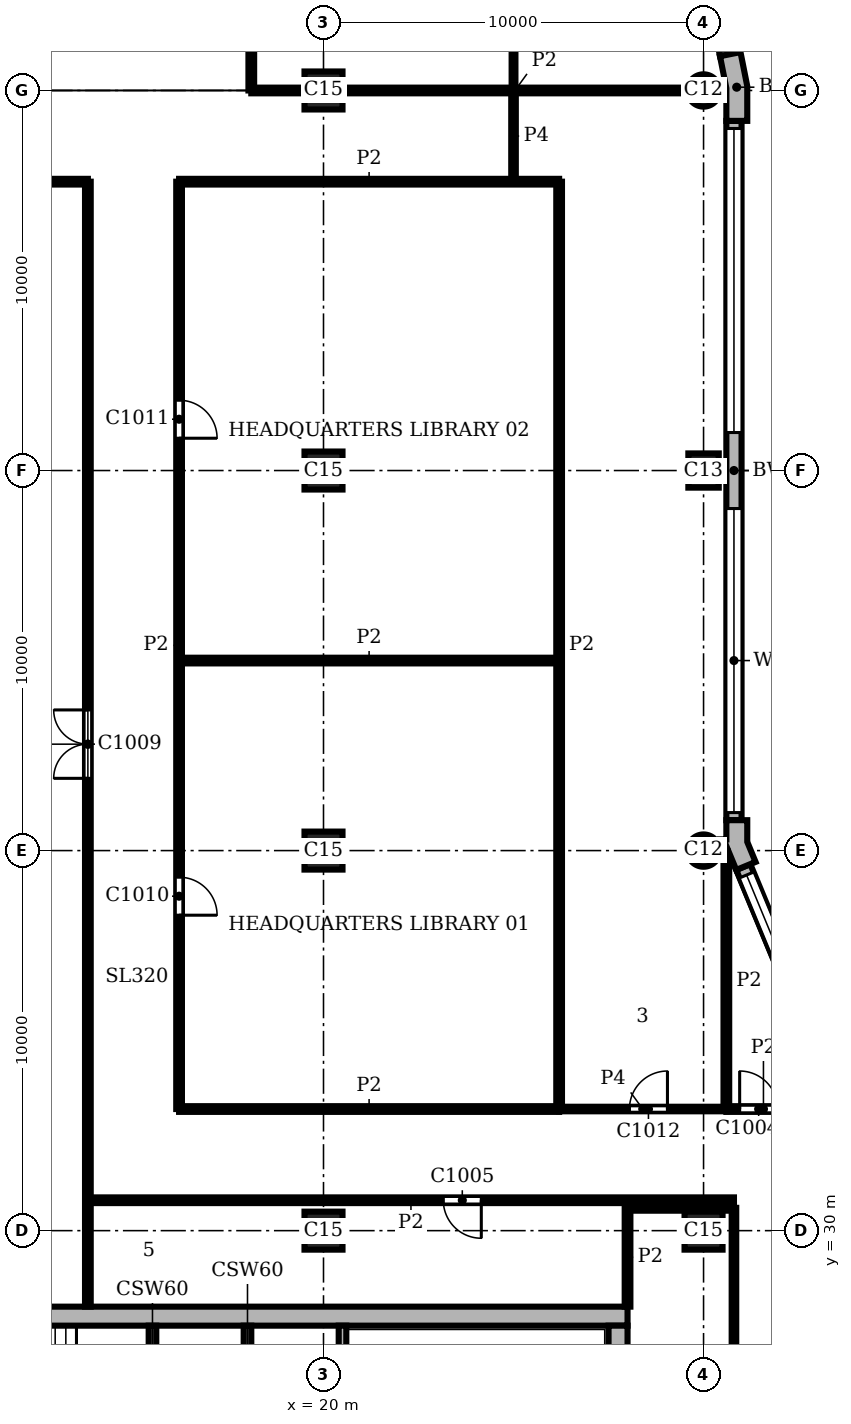
"""IFC4 building model, lengths in metres.
Left out: names, types, materials, properties, quantities, classifications, styles, units other than length and angle.
Written with IfcOpenShell. Run it as: python <this file> out.ifc"""

import sys

from ifc_helpers import new_model, si_unit, direction, frame, frame_2d, origin, origin_2d, place, context, subcontext, project, spatial, polyline, rectangle, circle, outline, extrude, element, fill, save


model = new_model("IFC4")
c1 = context("Model", 3, precision=1e-05, world=origin(), true_north=direction((0.0, 1.0)))
c2 = subcontext(c1, "Body", "Model", "MODEL_VIEW")
j1 = project(units=[si_unit("LENGTHUNIT", "METRE"), si_unit("PLANEANGLEUNIT", "RADIAN")], contexts=[c1])
p1 = place(None, origin())
s1 = spatial("IfcSite", under=j1, at=p1, CompositionType="ELEMENT")
p2 = place(p1, origin())
s2 = spatial("IfcBuilding", under=s1, at=p2, CompositionType="ELEMENT")
p3 = place(p2, frame((0.0, 0.0, 341.1)))
s3 = spatial("IfcBuildingStorey", under=s2, at=p3, CompositionType="ELEMENT", Elevation=341.1)
p4 = place(p3, frame((30.0, 40.0, 0.0), z_axis=(0.0, 0.0, 1.0), x_axis=(1.0, 0.0, 0.0)))
e1 = element("IfcColumn", 1, at=p4, inside=s3, PredefinedType="COLUMN", context=c2, shape_type="SweptSolid", body=[
    extrude(circle(Radius=0.425, at=origin_2d()), origin(), (0.0, 0.0, 1.0), 3.9),
])
p5 = place(p3, frame((30.0, 50.0, 0.0), z_axis=(0.0, 0.0, 1.0), x_axis=(0.0, 1.0, 0.0)))
e2 = element("IfcColumn", 2, at=p5, inside=s3, PredefinedType="COLUMN", context=c2, shape_type="SweptSolid", body=[
    extrude(rectangle(XDim=0.9, YDim=0.8, at=origin_2d()), origin(), (0.0, 0.0, 1.0), 3.9),
])
p6 = place(p3, frame((30.0, 60.0, 0.0), z_axis=(0.0, 0.0, 1.0), x_axis=(1.0, 0.0, 0.0)))
e3 = element("IfcColumn", 3, at=p6, inside=s3, PredefinedType="COLUMN", context=c2, shape_type="SweptSolid", body=[
    extrude(circle(Radius=0.425, at=origin_2d()), origin(), (0.0, 0.0, 1.0), 3.9),
])
for number, where, z_axis, x_axis in (
    (4, (20.0, 30.0, 0.0), (0.0, 0.0, 1.0), (1.0, 0.0, 0.0)),
    (5, (20.0, 40.0, 0.0), (0.0, 0.0, 1.0), (1.0, 0.0, 0.0)),
    (6, (20.0, 50.0, 0.0), (0.0, 0.0, 1.0), (1.0, 0.0, 0.0)),
    (7, (20.0, 60.0, 0.0), (0.0, 0.0, 1.0), (1.0, 0.0, 0.0)),
    (8, (30.0, 30.0, 0.0), (0.0, 0.0, 1.0), (1.0, 0.0, 0.0)),
):
    element("IfcColumn", number, at=place(p3, frame(where, z_axis=z_axis, x_axis=x_axis)), inside=s3, PredefinedType="COLUMN", context=c2, shape_type="SweptSolid", body=[
        extrude(rectangle(XDim=1.0, YDim=1.0, at=origin_2d()), origin(), (0.0, 0.0, 1.0), 3.9),
    ])
p7 = place(p3, frame((27.75, 8.5, 0.0), z_axis=(0.0, 0.0, 1.0), x_axis=(0.0, 1.0, 0.0)))
e9 = element("IfcWall", 9, at=p7, inside=s3, PredefinedType="SHEAR", context=c2, shape_type="SweptSolid", body=[
    extrude(rectangle(XDim=19.0, YDim=0.5, at=frame_2d((9.5, 0.0))), origin(), (0.0, 0.0, 1.0), 3.9),
])
p8 = place(p7, frame((4.95, 0.0, 0.0)))
e10 = element("IfcOpeningElement", 10, at=p8, cuts=e9, PredefinedType="OPENING", context=c2, shape_type="SweptSolid", body=[
    extrude(rectangle(XDim=1.6, YDim=2.1, at=frame_2d((0.8, 1.05))), frame((0.0, 0.26, 0.0), z_axis=(0.0, -1.0, 0.0), x_axis=(1.0, 0.0, 0.0)), (0.0, 0.0, 1.0), 0.52),
])
p9 = place(p3, frame((28.0, 27.75, 0.0), z_axis=(0.0, 0.0, 1.0), x_axis=(-1.0, 0.0, 0.0)))
e11 = element("IfcWall", 11, at=p9, inside=s3, PredefinedType="SHEAR", context=c2, shape_type="SweptSolid", body=[
    extrude(rectangle(XDim=20.0, YDim=0.5, at=frame_2d((10.0, 0.0))), origin(), (0.0, 0.0, 1.0), 3.9),
])
p10 = place(p3, origin())
e12 = element("IfcWall", 12, at=p10, inside=s3, PredefinedType="SOLIDWALL", context=c2, shape_type="SweptSolid", body=[
    extrude(outline(polyline([(30.62, 39.995), (30.62, 40.071), (30.861, 39.49), (31.23, 39.644), (31.369, 39.701), (31.15, 40.229), (31.15, 40.8), (31.0, 40.8), (30.6, 40.8), (30.6, 40.295), (30.425, 40.295), (30.425, 39.995), (30.62, 39.995)])), origin(), (0.0, 0.0, 1.0), 3.9),
])
e13 = element("IfcWall", 13, at=p10, inside=s3, PredefinedType="SOLIDWALL", context=c2, shape_type="SweptSolid", body=[
    extrude(outline(polyline([(31.0, 59.2), (31.15, 59.2), (31.15, 60.113), (30.972, 61.009), (30.825, 60.98), (30.432, 60.902), (30.6, 60.059), (30.6, 59.2), (31.0, 59.2)])), origin(), (0.0, 0.0, 1.0), 3.9),
])
p11 = place(p3, frame((33.362, 33.974, 0.0), z_axis=(0.0, 0.0, 1.0), x_axis=(-0.382655745237, 0.923891000409, 0.0)))
e14 = element("IfcWall", 14, at=p11, inside=s3, PredefinedType="SOLIDWALL", context=c2, shape_type="SweptSolid", body=[
    extrude(rectangle(XDim=6.053, YDim=0.4, at=frame_2d((3.027, 0.0))), origin(), (0.0, 0.0, 1.0), 3.9),
])
p12 = place(p11, frame((0.227, 0.0, 0.9)))
e15 = element("IfcOpeningElement", 15, at=p12, cuts=e14, PredefinedType="OPENING", context=c2, shape_type="SweptSolid", body=[
    extrude(rectangle(XDim=5.6, YDim=2.35, at=frame_2d((2.8, 1.175))), frame((0.0, 0.21, 0.0), z_axis=(0.0, -1.0, 0.0), x_axis=(1.0, 0.0, 0.0)), (0.0, 0.0, 1.0), 0.42),
])
p13 = place(p3, frame((30.8, 40.8, 0.0), z_axis=(0.0, 0.0, 1.0), x_axis=(0.0, 1.0, 0.0)))
e16 = element("IfcWall", 16, at=p13, inside=s3, PredefinedType="SOLIDWALL", context=c2, shape_type="SweptSolid", body=[
    extrude(rectangle(XDim=18.4, YDim=0.4, at=frame_2d((9.2, 0.0))), origin(), (0.0, 0.0, 1.0), 3.9),
])
p14 = place(p13, frame((0.2, 0.0, 0.9)))
e17 = element("IfcOpeningElement", 17, at=p14, cuts=e16, PredefinedType="OPENING", context=c2, shape_type="SweptSolid", body=[
    extrude(rectangle(XDim=8.0, YDim=2.35, at=frame_2d((4.0, 1.175))), frame((0.0, 0.21, 0.0), z_axis=(0.0, -1.0, 0.0), x_axis=(1.0, 0.0, 0.0)), (0.0, 0.0, 1.0), 0.42),
])
p15 = place(p13, frame((10.2, 0.0, 0.9)))
e18 = element("IfcOpeningElement", 18, at=p15, cuts=e16, PredefinedType="OPENING", context=c2, shape_type="SweptSolid", body=[
    extrude(rectangle(XDim=8.0, YDim=2.35, at=frame_2d((4.0, 1.175))), frame((0.0, 0.21, 0.0), z_axis=(0.0, -1.0, 0.0), x_axis=(1.0, 0.0, 0.0)), (0.0, 0.0, 1.0), 0.42),
])
p16 = place(p3, frame((30.629, 60.941, 0.0), z_axis=(0.0, 0.0, 1.0), x_axis=(-0.195098533057, 0.98078364709, 0.0)))
e19 = element("IfcWall", 19, at=p16, inside=s3, PredefinedType="SOLIDWALL", context=c2, shape_type="SweptSolid", body=[
    extrude(rectangle(XDim=4.753, YDim=0.4, at=frame_2d((2.376, 0.0))), origin(), (0.0, 0.0, 1.0), 3.9),
])
p17 = place(p16, frame((0.226, 0.0, 0.9)))
e20 = element("IfcOpeningElement", 20, at=p17, cuts=e19, PredefinedType="OPENING", context=c2, shape_type="SweptSolid", body=[
    extrude(rectangle(XDim=4.3, YDim=2.35, at=frame_2d((2.15, 1.175))), frame((0.0, 0.21, 0.0), z_axis=(0.0, -1.0, 0.0), x_axis=(1.0, 0.0, 0.0)), (0.0, 0.0, 1.0), 0.42),
])
p18 = place(p3, frame((15.5, 23.6, 0.0), z_axis=(0.0, 0.0, 1.0), x_axis=(0.0, 1.0, 0.0)))
e21 = element("IfcWall", 21, at=p18, inside=s3, PredefinedType="SHEAR", context=c2, shape_type="SweptSolid", body=[
    extrude(rectangle(XDim=3.9, YDim=0.2, at=frame_2d((1.95, 0.0))), origin(), (0.0, 0.0, 1.0), 3.58),
])
p19 = place(p3, frame((18.0, 20.0, 0.0), z_axis=(0.0, 0.0, 1.0), x_axis=(0.0, 1.0, 0.0)))
e22 = element("IfcWall", 22, at=p19, inside=s3, PredefinedType="SHEAR", context=c2, shape_type="SweptSolid", body=[
    extrude(rectangle(XDim=7.5, YDim=0.2, at=frame_2d((3.75, 0.0))), origin(), (0.0, 0.0, 1.0), 3.58),
])
p20 = place(p19, frame((1.2, 0.0, 0.0)))
e23 = element("IfcOpeningElement", 23, at=p20, cuts=e22, PredefinedType="OPENING", context=c2, shape_type="SweptSolid", body=[
    extrude(rectangle(XDim=1.2, YDim=2.1, at=frame_2d((0.6, 1.05))), frame((0.0, 0.11, 0.0), z_axis=(0.0, -1.0, 0.0), x_axis=(1.0, 0.0, 0.0)), (0.0, 0.0, 1.0), 0.22),
])
p21 = place(p3, frame((20.5, 23.6, 0.0), z_axis=(0.0, 0.0, 1.0), x_axis=(0.0, 1.0, 0.0)))
e24 = element("IfcWall", 24, at=p21, inside=s3, PredefinedType="SHEAR", context=c2, shape_type="SweptSolid", body=[
    extrude(rectangle(XDim=3.9, YDim=0.2, at=frame_2d((1.95, 0.0))), origin(), (0.0, 0.0, 1.0), 3.58),
])
p22 = place(p3, frame((25.0, 60.0, 0.0), z_axis=(0.0, 0.0, 1.0), x_axis=(0.0, 1.0, 0.0)))
e25 = element("IfcWall", 25, at=p22, inside=s3, PredefinedType="PARTITIONING", context=c2, shape_type="SweptSolid", body=[
    extrude(rectangle(XDim=8.0, YDim=0.1, at=frame_2d((4.0, 0.0))), origin(), (0.0, 0.0, 1.0), 3.58),
])
p23 = place(p22, frame((2.6, 0.0, 0.0)))
e26 = element("IfcOpeningElement", 26, at=p23, cuts=e25, PredefinedType="OPENING", context=c2, shape_type="SweptSolid", body=[
    extrude(rectangle(XDim=0.9, YDim=2.1, at=frame_2d((0.45, 1.05))), frame((0.0, 0.06, 0.0), z_axis=(0.0, -1.0, 0.0), x_axis=(1.0, 0.0, 0.0)), (0.0, 0.0, 1.0), 0.12),
])
p24 = place(p3, frame((13.8, 28.0, 0.0), z_axis=(0.0, 0.0, 1.0), x_axis=(0.0, 1.0, 0.0)))
e27 = element("IfcWall", 27, at=p24, inside=s3, PredefinedType="PARTITIONING", context=c2, shape_type="SweptSolid", body=[
    extrude(rectangle(XDim=29.6, YDim=0.15, at=frame_2d((14.8, 0.0))), origin(), (0.0, 0.0, 1.0), 3.58),
])
p25 = place(p24, frame((13.901, 0.0, 0.0)))
e28 = element("IfcOpeningElement", 28, at=p25, cuts=e27, PredefinedType="OPENING", context=c2, shape_type="SweptSolid", body=[
    extrude(rectangle(XDim=1.8, YDim=2.1, at=frame_2d((0.9, 1.05))), frame((0.0, 0.085, 0.0), z_axis=(0.0, -1.0, 0.0), x_axis=(1.0, 0.0, 0.0)), (0.0, 0.0, 1.0), 0.17),
])
p26 = place(p3, frame((16.2, 33.2, 0.0), z_axis=(0.0, 0.0, 1.0), x_axis=(0.0, 1.0, 0.0)))
e29 = element("IfcWall", 29, at=p26, inside=s3, PredefinedType="PARTITIONING", context=c2, shape_type="SweptSolid", body=[
    extrude(rectangle(XDim=24.4, YDim=0.15, at=frame_2d((12.2, 0.0))), origin(), (0.0, 0.0, 1.0), 3.58),
])
p27 = place(p26, frame((5.1, 0.0, 0.0)))
e30 = element("IfcOpeningElement", 30, at=p27, cuts=e29, PredefinedType="OPENING", context=c2, shape_type="SweptSolid", body=[
    extrude(rectangle(XDim=1.0, YDim=2.1, at=frame_2d((0.5, 1.05))), frame((0.0, 0.085, 0.0), z_axis=(0.0, -1.0, 0.0), x_axis=(1.0, 0.0, 0.0)), (0.0, 0.0, 1.0), 0.17),
])
p28 = place(p26, frame((17.65, 0.0, 0.0)))
e31 = element("IfcOpeningElement", 31, at=p28, cuts=e29, PredefinedType="OPENING", context=c2, shape_type="SweptSolid", body=[
    extrude(rectangle(XDim=1.0, YDim=2.1, at=frame_2d((0.5, 1.05))), frame((0.0, 0.085, 0.0), z_axis=(0.0, -1.0, 0.0), x_axis=(1.0, 0.0, 0.0)), (0.0, 0.0, 1.0), 0.17),
])
p29 = place(p3, frame((18.1, 60.0, 0.0), z_axis=(0.0, 0.0, 1.0), x_axis=(0.0, 1.0, 0.0)))
e32 = element("IfcWall", 32, at=p29, inside=s3, PredefinedType="PARTITIONING", context=c2, shape_type="SweptSolid", body=[
    extrude(rectangle(XDim=6.4, YDim=0.15, at=frame_2d((3.2, 0.0))), origin(), (0.0, 0.0, 1.0), 3.58),
])
p30 = place(p29, frame((2.35, 0.0, 0.0)))
e33 = element("IfcOpeningElement", 33, at=p30, cuts=e32, PredefinedType="OPENING", context=c2, shape_type="SweptSolid", body=[
    extrude(rectangle(XDim=1.0, YDim=2.1, at=frame_2d((0.5, 1.05))), frame((0.0, 0.085, 0.0), z_axis=(0.0, -1.0, 0.0), x_axis=(1.0, 0.0, 0.0)), (0.0, 0.0, 1.0), 0.17),
])
p31 = place(p3, frame((26.2, 33.2, 0.0), z_axis=(0.0, 0.0, 1.0), x_axis=(0.0, 1.0, 0.0)))
e34 = element("IfcWall", 34, at=p31, inside=s3, PredefinedType="PARTITIONING", context=c2, shape_type="SweptSolid", body=[
    extrude(rectangle(XDim=24.4, YDim=0.15, at=frame_2d((12.2, 0.0))), origin(), (0.0, 0.0, 1.0), 3.58),
])
p32 = place(p3, frame((28.0, 28.0, 0.0), z_axis=(0.0, 0.0, 1.0), x_axis=(0.0, 1.0, 0.0)))
e35 = element("IfcWall", 35, at=p32, inside=s3, PredefinedType="PARTITIONING", context=c2, shape_type="SweptSolid", body=[
    extrude(rectangle(XDim=2.598, YDim=0.15, at=frame_2d((1.299, 0.0))), origin(), (0.0, 0.0, 1.0), 3.58),
])
p33 = place(p3, frame((30.6, 33.2, 0.0), z_axis=(0.0, 0.0, 1.0), x_axis=(0.0, 1.0, 0.0)))
e36 = element("IfcWall", 36, at=p33, inside=s3, PredefinedType="PARTITIONING", context=c2, shape_type="SweptSolid", body=[
    extrude(rectangle(XDim=6.738, YDim=0.15, at=frame_2d((3.369, 0.0))), origin(), (0.0, 0.0, 1.0), 3.58),
])
p34 = place(p3, frame((28.002, 30.6, 0.0), z_axis=(0.0, 0.0, 1.0), x_axis=(1.0, 0.0, 0.0)))
e37 = element("IfcWall", 37, at=p34, inside=s3, PredefinedType="PARTITIONING", context=c2, shape_type="SweptSolid", body=[
    extrude(rectangle(XDim=2.798, YDim=0.15, at=frame_2d((1.399, 0.0))), origin(), (0.0, 0.0, 1.0), 3.58),
])
p35 = place(p3, frame((13.802, 30.8, 0.0), z_axis=(0.0, 0.0, 1.0), x_axis=(1.0, 0.0, 0.0)))
e38 = element("IfcWall", 38, at=p35, inside=s3, PredefinedType="PARTITIONING", context=c2, shape_type="SweptSolid", body=[
    extrude(rectangle(XDim=16.998, YDim=0.15, at=frame_2d((8.499, 0.0))), origin(), (0.0, 0.0, 1.0), 3.58),
])
p36 = place(p35, frame((9.35, 0.0, 0.0)))
e39 = element("IfcOpeningElement", 39, at=p36, cuts=e38, PredefinedType="OPENING", context=c2, shape_type="SweptSolid", body=[
    extrude(rectangle(XDim=1.0, YDim=2.1, at=frame_2d((0.5, 1.05))), frame((0.0, 0.085, 0.0), z_axis=(0.0, -1.0, 0.0), x_axis=(1.0, 0.0, 0.0)), (0.0, 0.0, 1.0), 0.17),
])
p37 = place(p3, frame((16.2, 33.2, 0.0), z_axis=(0.0, 0.0, 1.0), x_axis=(1.0, 0.0, 0.0)))
e40 = element("IfcWall", 40, at=p37, inside=s3, PredefinedType="PARTITIONING", context=c2, shape_type="SweptSolid", body=[
    extrude(rectangle(XDim=10.0, YDim=0.15, at=frame_2d((5.0, 0.0))), origin(), (0.0, 0.0, 1.0), 3.58),
])
p38 = place(p3, frame((30.6, 33.2, 0.0), z_axis=(0.0, 0.0, 1.0), x_axis=(1.0, 0.0, 0.0)))
e41 = element("IfcWall", 41, at=p38, inside=s3, PredefinedType="PARTITIONING", context=c2, shape_type="SweptSolid", body=[
    extrude(rectangle(XDim=1.952, YDim=0.15, at=frame_2d((0.976, 0.0))), origin(), (0.0, 0.0, 1.0), 3.58),
])
p39 = place(p38, frame((0.35, 0.0, 0.0)))
e42 = element("IfcOpeningElement", 42, at=p39, cuts=e41, PredefinedType="OPENING", context=c2, shape_type="SweptSolid", body=[
    extrude(rectangle(XDim=1.0, YDim=2.1, at=frame_2d((0.5, 1.05))), frame((0.0, 0.085, 0.0), z_axis=(0.0, -1.0, 0.0), x_axis=(1.0, 0.0, 0.0)), (0.0, 0.0, 1.0), 0.17),
])
p40 = place(p3, frame((16.2, 45.0, 0.0), z_axis=(0.0, 0.0, 1.0), x_axis=(1.0, 0.0, 0.0)))
e43 = element("IfcWall", 43, at=p40, inside=s3, PredefinedType="PARTITIONING", context=c2, shape_type="SweptSolid", body=[
    extrude(rectangle(XDim=10.0, YDim=0.15, at=frame_2d((5.0, 0.0))), origin(), (0.0, 0.0, 1.0), 3.58),
])
p41 = place(p3, frame((5.0, 57.6, 0.0), z_axis=(0.0, 0.0, 1.0), x_axis=(1.0, 0.0, 0.0)))
e44 = element("IfcWall", 44, at=p41, inside=s3, PredefinedType="PARTITIONING", context=c2, shape_type="SweptSolid", body=[
    extrude(rectangle(XDim=8.8, YDim=0.15, at=frame_2d((4.4, 0.0))), origin(), (0.0, 0.0, 1.0), 3.58),
])
p42 = place(p3, frame((16.2, 57.6, 0.0), z_axis=(0.0, 0.0, 1.0), x_axis=(1.0, 0.0, 0.0)))
e45 = element("IfcWall", 45, at=p42, inside=s3, PredefinedType="PARTITIONING", context=c2, shape_type="SweptSolid", body=[
    extrude(rectangle(XDim=10.0, YDim=0.15, at=frame_2d((5.0, 0.0))), origin(), (0.0, 0.0, 1.0), 3.58),
])
p43 = place(p3, frame((18.1, 60.0, 0.0), z_axis=(0.0, 0.0, 1.0), x_axis=(1.0, 0.0, 0.0)))
e46 = element("IfcWall", 46, at=p43, inside=s3, PredefinedType="PARTITIONING", context=c2, shape_type="SweptSolid", body=[
    extrude(rectangle(XDim=1.4, YDim=0.15, at=frame_2d((0.7, 0.0))), origin(), (0.0, 0.0, 1.0), 3.58),
])
p44 = place(p3, frame((20.5, 60.0, 0.0), z_axis=(0.0, 0.0, 1.0), x_axis=(1.0, 0.0, 0.0)))
e47 = element("IfcWall", 47, at=p44, inside=s3, PredefinedType="PARTITIONING", context=c2, shape_type="SweptSolid", body=[
    extrude(rectangle(XDim=9.075, YDim=0.15, at=frame_2d((4.538, 0.0))), origin(), (0.0, 0.0, 1.0), 3.58),
])
p45 = place(p3, frame((25.0, 57.6, 0.0), z_axis=(0.0, 0.0, 1.0), x_axis=(0.0, 1.0, 0.0)))
e48 = element("IfcWall", 48, at=p45, inside=s3, PredefinedType="PARTITIONING", context=c2, shape_type="SweptSolid", body=[
    extrude(rectangle(XDim=2.4, YDim=0.12, at=frame_2d((1.2, 0.0))), origin(), (0.0, 0.0, 1.0), 3.58),
])
p46 = place(p3, frame((30.8, 15.45, 0.0), z_axis=(0.0, 0.0, 1.0), x_axis=(0.0, 1.0, 0.0)))
e49 = element("IfcWall", 49, at=p46, inside=s3, PredefinedType="PARTITIONING", context=c2, shape_type="SweptSolid", body=[
    extrude(rectangle(XDim=15.15, YDim=0.12, at=frame_2d((7.575, 0.0))), origin(), (0.0, 0.0, 1.0), 3.58),
])
p47 = place(p46, frame((6.1, 0.0, 0.0)))
e50 = element("IfcOpeningElement", 50, at=p47, cuts=e49, PredefinedType="OPENING", context=c2, shape_type="SweptSolid", body=[
    extrude(rectangle(XDim=1.0, YDim=2.1, at=frame_2d((0.5, 1.05))), frame((0.0, 0.07, 0.0), z_axis=(0.0, -1.0, 0.0), x_axis=(1.0, 0.0, 0.0)), (0.0, 0.0, 1.0), 0.14),
])
p48 = place(p3, frame((26.2, 33.2, 0.0), z_axis=(0.0, 0.0, 1.0), x_axis=(1.0, 0.0, 0.0)))
e51 = element("IfcWall", 51, at=p48, inside=s3, PredefinedType="PARTITIONING", context=c2, shape_type="SweptSolid", body=[
    extrude(rectangle(XDim=4.4, YDim=0.12, at=frame_2d((2.2, 0.0))), origin(), (0.0, 0.0, 1.0), 3.58),
])
p49 = place(p48, frame((1.85, 0.0, 0.0)))
e52 = element("IfcOpeningElement", 52, at=p49, cuts=e51, PredefinedType="OPENING", context=c2, shape_type="SweptSolid", body=[
    extrude(rectangle(XDim=1.0, YDim=2.1, at=frame_2d((0.5, 1.05))), frame((0.0, 0.07, 0.0), z_axis=(0.0, -1.0, 0.0), x_axis=(1.0, 0.0, 0.0)), (0.0, 0.0, 1.0), 0.14),
])
p50 = place(p12, origin())
e53 = element("IfcWindow", 53, at=p50, inside=s3, PartitioningType="SINGLE_PANEL", PredefinedType="WINDOW", context=c2, shape_type="SweptSolid", body=[
    extrude(rectangle(XDim=5.6, YDim=2.35, at=frame_2d((2.8, 1.175))), frame((0.0, 0.16, 0.0), z_axis=(0.0, -1.0, 0.0), x_axis=(1.0, 0.0, 0.0)), (0.0, 0.0, 1.0), 0.06),
])
fill(e15, e53)
p51 = place(p14, origin())
e54 = element("IfcWindow", 54, at=p51, inside=s3, PartitioningType="SINGLE_PANEL", PredefinedType="WINDOW", context=c2, shape_type="SweptSolid", body=[
    extrude(rectangle(XDim=8.0, YDim=2.35, at=frame_2d((4.0, 1.175))), frame((0.0, 0.16, 0.0), z_axis=(0.0, -1.0, 0.0), x_axis=(1.0, 0.0, 0.0)), (0.0, 0.0, 1.0), 0.06),
])
fill(e17, e54)
p52 = place(p15, origin())
e55 = element("IfcWindow", 55, at=p52, inside=s3, PartitioningType="SINGLE_PANEL", PredefinedType="WINDOW", context=c2, shape_type="SweptSolid", body=[
    extrude(rectangle(XDim=8.0, YDim=2.35, at=frame_2d((4.0, 1.175))), frame((0.0, 0.16, 0.0), z_axis=(0.0, -1.0, 0.0), x_axis=(1.0, 0.0, 0.0)), (0.0, 0.0, 1.0), 0.06),
])
fill(e18, e55)
p53 = place(p39, origin())
e56 = element("IfcDoor", 56, at=p53, inside=s3, OperationType="SINGLE_SWING_LEFT", PredefinedType="DOOR", context=c2, shape_type="SweptSolid", body=[
    extrude(rectangle(XDim=1.0, YDim=2.1, at=frame_2d((0.5, 1.05))), frame((0.0, 0.025, 0.0), z_axis=(0.0, -1.0, 0.0), x_axis=(1.0, 0.0, 0.0)), (0.0, 0.0, 1.0), 0.05),
])
fill(e42, e56)
p54 = place(p36, frame((1.0, 0.0, 0.0), z_axis=(0.0, 0.0, 1.0), x_axis=(-1.0, 0.0, 0.0)))
e57 = element("IfcDoor", 57, at=p54, inside=s3, OperationType="SINGLE_SWING_LEFT", PredefinedType="DOOR", context=c2, shape_type="SweptSolid", body=[
    extrude(rectangle(XDim=1.0, YDim=2.1, at=frame_2d((0.5, 1.05))), frame((0.0, 0.025, 0.0), z_axis=(0.0, -1.0, 0.0), x_axis=(1.0, 0.0, 0.0)), (0.0, 0.0, 1.0), 0.05),
])
fill(e39, e57)
p55 = place(p25, origin())
e58 = element("IfcDoor", 58, at=p55, inside=s3, OperationType="DOUBLE_DOOR_SINGLE_SWING", PredefinedType="DOOR", context=c2, shape_type="SweptSolid", body=[
    extrude(rectangle(XDim=1.8, YDim=2.1, at=frame_2d((0.9, 1.05))), frame((0.0, 0.025, 0.0), z_axis=(0.0, -1.0, 0.0), x_axis=(1.0, 0.0, 0.0)), (0.0, 0.0, 1.0), 0.05),
])
fill(e28, e58)
p56 = place(p27, frame((1.0, 0.0, 0.0), z_axis=(0.0, 0.0, 1.0), x_axis=(-1.0, 0.0, 0.0)))
e59 = element("IfcDoor", 59, at=p56, inside=s3, OperationType="SINGLE_SWING_RIGHT", PredefinedType="DOOR", context=c2, shape_type="SweptSolid", body=[
    extrude(rectangle(XDim=1.0, YDim=2.1, at=frame_2d((0.5, 1.05))), frame((0.0, 0.025, 0.0), z_axis=(0.0, -1.0, 0.0), x_axis=(1.0, 0.0, 0.0)), (0.0, 0.0, 1.0), 0.05),
])
fill(e30, e59)
p57 = place(p28, frame((1.0, 0.0, 0.0), z_axis=(0.0, 0.0, 1.0), x_axis=(-1.0, 0.0, 0.0)))
e60 = element("IfcDoor", 60, at=p57, inside=s3, OperationType="SINGLE_SWING_RIGHT", PredefinedType="DOOR", context=c2, shape_type="SweptSolid", body=[
    extrude(rectangle(XDim=1.0, YDim=2.1, at=frame_2d((0.5, 1.05))), frame((0.0, 0.025, 0.0), z_axis=(0.0, -1.0, 0.0), x_axis=(1.0, 0.0, 0.0)), (0.0, 0.0, 1.0), 0.05),
])
fill(e31, e60)
p58 = place(p49, origin())
e61 = element("IfcDoor", 61, at=p58, inside=s3, OperationType="SINGLE_SWING_RIGHT", PredefinedType="DOOR", context=c2, shape_type="SweptSolid", body=[
    extrude(rectangle(XDim=1.0, YDim=2.1, at=frame_2d((0.5, 1.05))), frame((0.0, 0.025, 0.0), z_axis=(0.0, -1.0, 0.0), x_axis=(1.0, 0.0, 0.0)), (0.0, 0.0, 1.0), 0.05),
])
fill(e52, e61)
save(model, sys.argv[1])
